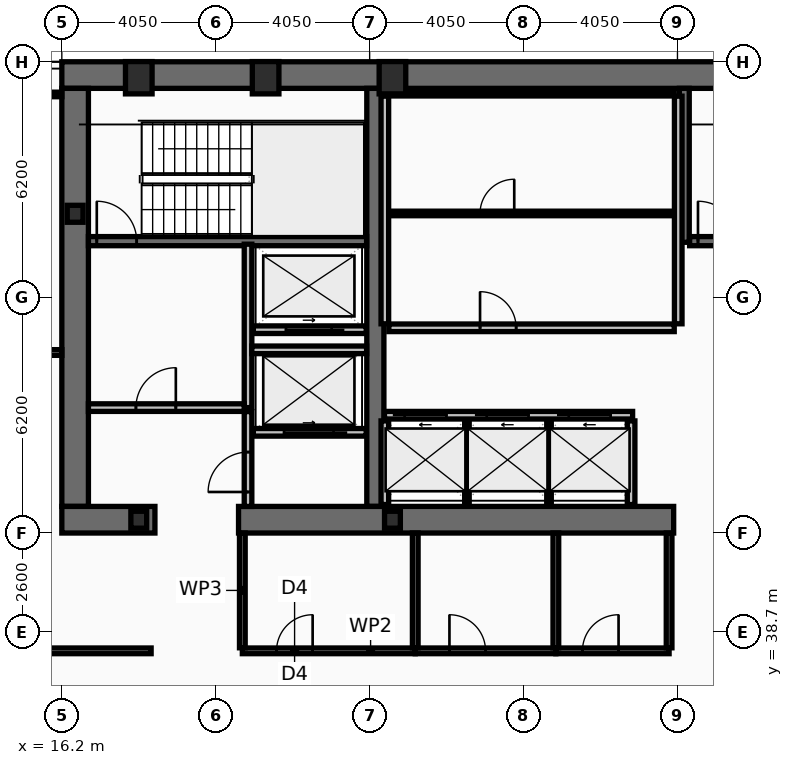
"""IFC4 building model, lengths in metres.
Left out: names, types, materials, properties, quantities, classifications, styles, units other than length and angle.
Written with IfcOpenShell. Run it as: python <this file> out.ifc"""

import sys

from ifc_helpers import new_model, si_unit, direction, frame, frame_2d, origin, origin_2d, place, context, subcontext, project, spatial, rectangle, hollow_rectangle, i_section, extrude, element, fill, save


model = new_model("IFC4")
c1 = context("Model", 3, precision=1e-05, world=origin(), true_north=direction((0.0, 1.0)))
c2 = subcontext(c1, "Body", "Model", "MODEL_VIEW")
j1 = project(units=[si_unit("LENGTHUNIT", "METRE"), si_unit("PLANEANGLEUNIT", "RADIAN")], contexts=[c1])
p1 = place(None, origin())
s1 = spatial("IfcSite", under=j1, at=p1, CompositionType="ELEMENT")
p2 = place(p1, origin())
s2 = spatial("IfcBuilding", under=s1, at=p2, CompositionType="ELEMENT")
p3 = place(p2, frame((0.0, 0.0, 118.2)))
s3 = spatial("IfcBuildingStorey", under=s2, at=p3, CompositionType="ELEMENT", Elevation=118.2)
p4 = place(p3, frame((16.2, 53.35, 0.0), z_axis=(0.0, 0.0, 1.0), x_axis=(1.0, 0.0, 0.0)))
e1 = element("IfcWall", 1, at=p4, inside=s3, PredefinedType="SHEAR", context=c2, shape_type="SweptSolid", body=[
    extrude(rectangle(XDim=40.5, YDim=0.7, at=frame_2d((20.25, 0.0))), origin(), (0.0, 0.0, 1.0), 3.44),
])
p5 = place(p3, frame((16.55, 42.0, 0.0), z_axis=(0.0, 0.0, 1.0), x_axis=(0.0, 1.0, 0.0)))
e2 = element("IfcWall", 2, at=p5, inside=s3, PredefinedType="SHEAR", context=c2, shape_type="SweptSolid", body=[
    extrude(rectangle(XDim=11.0, YDim=0.7, at=frame_2d((5.5, 0.0))), origin(), (0.0, 0.0, 1.0), 3.44),
])
p6 = place(p3, frame((24.45, 42.0, 0.0), z_axis=(0.0, 0.0, 1.0), x_axis=(0.0, 1.0, 0.0)))
e3 = element("IfcWall", 3, at=p6, inside=s3, PredefinedType="SHEAR", context=c2, shape_type="SweptSolid", body=[
    extrude(rectangle(XDim=11.0, YDim=0.45, at=frame_2d((5.5, 0.0))), origin(), (0.0, 0.0, 1.0), 3.44),
])
p7 = place(p3, frame((18.65, 41.65, 0.0), z_axis=(0.0, 0.0, 1.0), x_axis=(-1.0, 0.0, 0.0)))
e4 = element("IfcWall", 4, at=p7, inside=s3, PredefinedType="SHEAR", context=c2, shape_type="SweptSolid", body=[
    extrude(rectangle(XDim=2.45, YDim=0.7, at=frame_2d((1.225, 0.0))), origin(), (0.0, 0.0, 1.0), 3.44),
])
p8 = place(p3, frame((32.3, 41.65, 0.0), z_axis=(0.0, 0.0, 1.0), x_axis=(-1.0, 0.0, 0.0)))
e5 = element("IfcWall", 5, at=p8, inside=s3, PredefinedType="SHEAR", context=c2, shape_type="SweptSolid", body=[
    extrude(rectangle(XDim=11.45, YDim=0.7, at=frame_2d((5.725, 0.0))), origin(), (0.0, 0.0, 1.0), 3.44),
])
p9 = place(p3, frame((32.58, 48.95, 0.0), z_axis=(0.0, 0.0, 1.0), x_axis=(0.0, 1.0, 0.0)))
e6 = element("IfcWall", 6, at=p9, inside=s3, PredefinedType="SHEAR", context=c2, shape_type="SweptSolid", body=[
    extrude(rectangle(XDim=4.05, YDim=0.26, at=frame_2d((2.025, 0.0))), origin(), (0.0, 0.0, 1.0), 3.44),
])
p10 = place(p3, frame((16.9, 48.98, 0.0), z_axis=(0.0, 0.0, 1.0), x_axis=(1.0, 0.0, 0.0)))
e7 = element("IfcWall", 7, at=p10, inside=s3, PredefinedType="SHEAR", context=c2, shape_type="SweptSolid", body=[
    extrude(rectangle(XDim=7.32, YDim=0.24, at=frame_2d((3.66, 0.0))), origin(), (0.0, 0.0, 1.0), 3.44),
])
p11 = place(p10, frame((0.22, 0.0, 0.0)))
e8 = element("IfcOpeningElement", 8, at=p11, cuts=e7, PredefinedType="OPENING", context=c2, shape_type="SweptSolid", body=[
    extrude(rectangle(XDim=1.05, YDim=2.15, at=frame_2d((0.525, 1.075))), frame((0.0, 0.13, 0.0), z_axis=(0.0, -1.0, 0.0), x_axis=(1.0, 0.0, 0.0)), (0.0, 0.0, 1.0), 0.26),
])
p12 = place(p3, frame((32.72, 48.98, 0.0), z_axis=(0.0, 0.0, 1.0), x_axis=(1.0, 0.0, 0.0)))
e9 = element("IfcWall", 9, at=p12, inside=s3, PredefinedType="SHEAR", context=c2, shape_type="SweptSolid", body=[
    extrude(rectangle(XDim=7.56, YDim=0.24, at=frame_2d((3.78, 0.0))), origin(), (0.0, 0.0, 1.0), 3.44),
])
p13 = place(p12, frame((0.22, 0.0, 0.0)))
e10 = element("IfcOpeningElement", 10, at=p13, cuts=e9, PredefinedType="OPENING", context=c2, shape_type="SweptSolid", body=[
    extrude(rectangle(XDim=1.05, YDim=2.15, at=frame_2d((0.525, 1.075))), frame((0.0, 0.13, 0.0), z_axis=(0.0, -1.0, 0.0), x_axis=(1.0, 0.0, 0.0)), (0.0, 0.0, 1.0), 0.26),
])
for number, where, z_axis, x_axis in (
    (11, (18.225, 53.28, 0.0), (0.0, 0.0, 1.0), (1.0, 0.0, 0.0)),
    (12, (21.562, 53.28, 0.0), (0.0, 0.0, 1.0), (1.0, 0.0, 0.0)),
    (13, (24.9, 53.28, 0.0), (0.0, 0.0, 1.0), (1.0, 0.0, 0.0)),
):
    element("IfcColumn", number, at=place(p3, frame(where, z_axis=z_axis, x_axis=x_axis)), inside=s3, PredefinedType="COLUMN", context=c2, shape_type="SweptSolid", body=[
        extrude(hollow_rectangle(XDim=0.7, YDim=0.85, WallThickness=0.05, at=origin_2d()), origin(), (0.0, 0.0, 1.0), 3.6),
    ])
for number, where, z_axis, x_axis in (
    (14, (16.55, 49.7, 0.0), (0.0, 0.0, 1.0), (1.0, 0.0, 0.0)),
    (15, (18.225, 41.65, 0.0), (0.0, 0.0, 1.0), (1.0, 0.0, 0.0)),
    (16, (24.9, 41.65, 0.0), (0.0, 0.0, 1.0), (1.0, 0.0, 0.0)),
):
    element("IfcColumn", number, at=place(p3, frame(where, z_axis=z_axis, x_axis=x_axis)), inside=s3, PredefinedType="COLUMN", context=c2, shape_type="SweptSolid", body=[
        extrude(i_section(OverallWidth=0.416, OverallDepth=0.446, WebThickness=0.039, FlangeThickness=0.063, at=origin_2d()), origin(), (0.0, 0.0, 1.0), 3.6),
    ])
p14 = place(p3, frame((24.69, 44.4, 0.0), z_axis=(0.0, 0.0, 1.0), x_axis=(1.0, 0.0, 0.0)))
e17 = element("IfcWall", 17, at=p14, inside=s3, PredefinedType="PARTITIONING", context=c2, shape_type="SweptSolid", body=[
    extrude(rectangle(XDim=6.53, YDim=0.2, at=frame_2d((3.265, 0.0))), origin(), (0.0, 0.0, 1.0), 3.44),
])
p15 = place(p14, frame((0.53, 0.0, 0.0)))
e18 = element("IfcOpeningElement", 18, at=p15, cuts=e17, PredefinedType="OPENING", context=c2, shape_type="SweptSolid", body=[
    extrude(rectangle(XDim=1.1, YDim=2.18, at=frame_2d((0.55, 1.09))), frame((0.0, 0.11, 0.0), z_axis=(0.0, -1.0, 0.0), x_axis=(1.0, 0.0, 0.0)), (0.0, 0.0, 1.0), 0.22),
])
p16 = place(p14, frame((2.69, 0.0, 0.0)))
e19 = element("IfcOpeningElement", 19, at=p16, cuts=e17, PredefinedType="OPENING", context=c2, shape_type="SweptSolid", body=[
    extrude(rectangle(XDim=1.1, YDim=2.18, at=frame_2d((0.55, 1.09))), frame((0.0, 0.11, 0.0), z_axis=(0.0, -1.0, 0.0), x_axis=(1.0, 0.0, 0.0)), (0.0, 0.0, 1.0), 0.22),
])
p17 = place(p14, frame((4.85, 0.0, 0.0)))
e20 = element("IfcOpeningElement", 20, at=p17, cuts=e17, PredefinedType="OPENING", context=c2, shape_type="SweptSolid", body=[
    extrude(rectangle(XDim=1.1, YDim=2.18, at=frame_2d((0.55, 1.09))), frame((0.0, 0.11, 0.0), z_axis=(0.0, -1.0, 0.0), x_axis=(1.0, 0.0, 0.0)), (0.0, 0.0, 1.0), 0.22),
])
p18 = place(p3, frame((24.21, 43.95, 0.0), z_axis=(0.0, 0.0, 1.0), x_axis=(-1.0, 0.0, 0.0)))
e21 = element("IfcWall", 21, at=p18, inside=s3, PredefinedType="PARTITIONING", context=c2, shape_type="SweptSolid", body=[
    extrude(rectangle(XDim=2.97, YDim=0.2, at=frame_2d((1.485, 0.0))), origin(), (0.0, 0.0, 1.0), 3.44),
])
p19 = place(p18, frame((0.86, 0.0, 0.0)))
e22 = element("IfcOpeningElement", 22, at=p19, cuts=e21, PredefinedType="OPENING", context=c2, shape_type="SweptSolid", body=[
    extrude(rectangle(XDim=1.3, YDim=2.18, at=frame_2d((0.65, 1.09))), frame((0.0, 0.11, 0.0), z_axis=(0.0, -1.0, 0.0), x_axis=(1.0, 0.0, 0.0)), (0.0, 0.0, 1.0), 0.22),
])
p20 = place(p3, frame((24.21, 46.65, 0.0), z_axis=(0.0, 0.0, 1.0), x_axis=(-1.0, 0.0, 0.0)))
e23 = element("IfcWall", 23, at=p20, inside=s3, PredefinedType="PARTITIONING", context=c2, shape_type="SweptSolid", body=[
    extrude(rectangle(XDim=2.97, YDim=0.2, at=frame_2d((1.485, 0.0))), origin(), (0.0, 0.0, 1.0), 3.44),
])
p21 = place(p20, frame((0.91, 0.0, 0.0)))
e24 = element("IfcOpeningElement", 24, at=p21, cuts=e23, PredefinedType="OPENING", context=c2, shape_type="SweptSolid", body=[
    extrude(rectangle(XDim=1.2, YDim=2.18, at=frame_2d((0.6, 1.09))), frame((0.0, 0.11, 0.0), z_axis=(0.0, -1.0, 0.0), x_axis=(1.0, 0.0, 0.0)), (0.0, 0.0, 1.0), 0.22),
])
p22 = place(p3, frame((21.1, 44.6, 0.0), z_axis=(0.0, 0.0, 1.0), x_axis=(0.0, 1.0, 0.0)))
e25 = element("IfcWall", 25, at=p22, inside=s3, PredefinedType="PARTITIONING", context=c2, shape_type="SweptSolid", body=[
    extrude(rectangle(XDim=4.3, YDim=0.2, at=frame_2d((2.15, 0.0))), origin(), (0.0, 0.0, 1.0), 3.44),
])
p23 = place(p3, frame((16.9, 44.6, 0.0), z_axis=(0.0, 0.0, 1.0), x_axis=(1.0, 0.0, 0.0)))
e26 = element("IfcWall", 26, at=p23, inside=s3, PredefinedType="PARTITIONING", context=c2, shape_type="SweptSolid", body=[
    extrude(rectangle(XDim=4.1, YDim=0.2, at=frame_2d((2.05, 0.0))), origin(), (0.0, 0.0, 1.0), 3.44),
])
p24 = place(p23, frame((1.25, 0.0, 0.0)))
e27 = element("IfcOpeningElement", 27, at=p24, cuts=e26, PredefinedType="OPENING", context=c2, shape_type="SweptSolid", body=[
    extrude(rectangle(XDim=1.05, YDim=2.15, at=frame_2d((0.525, 1.075))), frame((0.0, 0.11, 0.0), z_axis=(0.0, -1.0, 0.0), x_axis=(1.0, 0.0, 0.0)), (0.0, 0.0, 1.0), 0.22),
])
p25 = place(p3, frame((21.2, 46.12, 0.0), z_axis=(0.0, 0.0, 1.0), x_axis=(1.0, 0.0, 0.0)))
e28 = element("IfcWall", 28, at=p25, inside=s3, PredefinedType="PARTITIONING", context=c2, shape_type="SweptSolid", body=[
    extrude(rectangle(XDim=3.02, YDim=0.2, at=frame_2d((1.51, 0.0))), origin(), (0.0, 0.0, 1.0), 3.44),
])
p26 = place(p3, frame((21.1, 42.0, 0.0), z_axis=(0.0, 0.0, 1.0), x_axis=(0.0, 1.0, 0.0)))
e29 = element("IfcWall", 29, at=p26, inside=s3, PredefinedType="PARTITIONING", context=c2, shape_type="SweptSolid", body=[
    extrude(rectangle(XDim=2.495, YDim=0.2, at=frame_2d((1.248, 0.0))), origin(), (0.0, 0.0, 1.0), 3.44),
])
p27 = place(p26, frame((0.38, 0.0, 0.0)))
e30 = element("IfcOpeningElement", 30, at=p27, cuts=e29, PredefinedType="OPENING", context=c2, shape_type="SweptSolid", body=[
    extrude(rectangle(XDim=1.05, YDim=2.15, at=frame_2d((0.525, 1.075))), frame((0.0, 0.11, 0.0), z_axis=(0.0, -1.0, 0.0), x_axis=(1.0, 0.0, 0.0)), (0.0, 0.0, 1.0), 0.22),
])
for number, where, z_axis, x_axis in (
    (31, (24.7, 46.805, 0.0), (0.0, 0.0, 1.0), (0.0, 1.0, 0.0)),
    (32, (32.42, 46.805, 0.0), (0.0, 0.0, 1.0), (0.0, 1.0, 0.0)),
):
    element("IfcWall", number, at=place(p3, frame(where, z_axis=z_axis, x_axis=x_axis)), inside=s3, PredefinedType="PARTITIONING", context=c2, shape_type="SweptSolid", body=[
        extrude(rectangle(XDim=5.99, YDim=0.2, at=frame_2d((2.995, 0.0))), origin(), (0.0, 0.0, 1.0), 3.44),
    ])
p28 = place(p3, frame((24.805, 52.86, 0.0), z_axis=(0.0, 0.0, 1.0), x_axis=(1.0, 0.0, 0.0)))
e33 = element("IfcWall", 33, at=p28, inside=s3, PredefinedType="PARTITIONING", context=c2, shape_type="SweptSolid", body=[
    extrude(rectangle(XDim=7.51, YDim=0.12, at=frame_2d((3.755, 0.0))), origin(), (0.0, 0.0, 1.0), 3.44),
])
p29 = place(p3, frame((24.805, 49.709, 0.0), z_axis=(0.0, 0.0, 1.0), x_axis=(1.0, 0.0, 0.0)))
e34 = element("IfcWall", 34, at=p29, inside=s3, PredefinedType="PARTITIONING", context=c2, shape_type="SweptSolid", body=[
    extrude(rectangle(XDim=7.51, YDim=0.12, at=frame_2d((3.755, 0.0))), origin(), (0.0, 0.0, 1.0), 3.44),
])
p30 = place(p29, frame((2.4, 0.0, 0.0)))
e35 = element("IfcOpeningElement", 35, at=p30, cuts=e34, PredefinedType="OPENING", context=c2, shape_type="SweptSolid", body=[
    extrude(rectangle(XDim=0.9, YDim=2.05, at=frame_2d((0.45, 1.025))), frame((0.0, 0.07, 0.0), z_axis=(0.0, -1.0, 0.0), x_axis=(1.0, 0.0, 0.0)), (0.0, 0.0, 1.0), 0.14),
])
p31 = place(p3, frame((24.805, 46.7, 0.0), z_axis=(0.0, 0.0, 1.0), x_axis=(1.0, 0.0, 0.0)))
e36 = element("IfcWall", 36, at=p31, inside=s3, PredefinedType="PARTITIONING", context=c2, shape_type="SweptSolid", body=[
    extrude(rectangle(XDim=7.51, YDim=0.2, at=frame_2d((3.755, 0.0))), origin(), (0.0, 0.0, 1.0), 3.44),
])
p32 = place(p31, frame((2.4, 0.0, 0.0)))
e37 = element("IfcOpeningElement", 37, at=p32, cuts=e36, PredefinedType="OPENING", context=c2, shape_type="SweptSolid", body=[
    extrude(rectangle(XDim=0.95, YDim=2.1, at=frame_2d((0.475, 1.05))), frame((0.0, 0.11, 0.0), z_axis=(0.0, -1.0, 0.0), x_axis=(1.0, 0.0, 0.0)), (0.0, 0.0, 1.0), 0.22),
])
for number, where, z_axis, x_axis in (
    (38, (24.7, 42.05, 0.0), (0.0, 0.0, 1.0), (0.0, 1.0, 0.0)),
    (39, (31.18, 42.05, 0.0), (0.0, 0.0, 1.0), (0.0, 1.0, 0.0)),
):
    element("IfcWall", number, at=place(p3, frame(where, z_axis=z_axis, x_axis=x_axis)), inside=s3, PredefinedType="PARTITIONING", context=c2, shape_type="SweptSolid", body=[
        extrude(rectangle(XDim=2.2, YDim=0.2, at=frame_2d((1.1, 0.0))), origin(), (0.0, 0.0, 1.0), 3.44),
    ])
for number, where, z_axis, x_axis in (
    (40, (26.86, 42.05, 0.0), (0.0, 0.0, 1.0), (0.0, 1.0, 0.0)),
    (41, (29.02, 42.05, 0.0), (0.0, 0.0, 1.0), (0.0, 1.0, 0.0)),
):
    element("IfcWall", number, at=place(p3, frame(where, z_axis=z_axis, x_axis=x_axis)), inside=s3, PredefinedType="PARTITIONING", context=c2, shape_type="SweptSolid", body=[
        extrude(rectangle(XDim=2.2, YDim=0.12, at=frame_2d((1.1, 0.0))), origin(), (0.0, 0.0, 1.0), 3.44),
    ])
p33 = place(p3, frame((20.95, 38.2, 0.0), z_axis=(0.0, 0.0, 1.0), x_axis=(1.0, 0.0, 0.0)))
e42 = element("IfcWall", 42, at=p33, inside=s3, PredefinedType="PARTITIONING", context=c2, shape_type="SweptSolid", body=[
    extrude(rectangle(XDim=4.55, YDim=0.15, at=frame_2d((2.275, 0.0))), origin(), (0.0, 0.0, 1.0), 2.73),
])
p34 = place(p33, frame((0.9, 0.0, 0.0)))
e43 = element("IfcOpeningElement", 43, at=p34, cuts=e42, PredefinedType="OPENING", context=c2, shape_type="SweptSolid", body=[
    extrude(rectangle(XDim=0.95, YDim=2.05, at=frame_2d((0.475, 1.025))), frame((0.0, 0.085, 0.0), z_axis=(0.0, -1.0, 0.0), x_axis=(1.0, 0.0, 0.0)), (0.0, 0.0, 1.0), 0.17),
])
p35 = place(p3, frame((25.5, 38.2, 0.0), z_axis=(0.0, 0.0, 1.0), x_axis=(1.0, 0.0, 0.0)))
e44 = element("IfcWall", 44, at=p35, inside=s3, PredefinedType="PARTITIONING", context=c2, shape_type="SweptSolid", body=[
    extrude(rectangle(XDim=3.7, YDim=0.15, at=frame_2d((1.85, 0.0))), origin(), (0.0, 0.0, 1.0), 3.44),
])
p36 = place(p35, frame((0.9, 0.0, 0.0)))
e45 = element("IfcOpeningElement", 45, at=p36, cuts=e44, PredefinedType="OPENING", context=c2, shape_type="SweptSolid", body=[
    extrude(rectangle(XDim=0.95, YDim=2.05, at=frame_2d((0.475, 1.025))), frame((0.0, 0.085, 0.0), z_axis=(0.0, -1.0, 0.0), x_axis=(1.0, 0.0, 0.0)), (0.0, 0.0, 1.0), 0.17),
])
p37 = place(p3, frame((29.2, 38.2, 0.0), z_axis=(0.0, 0.0, 1.0), x_axis=(1.0, 0.0, 0.0)))
e46 = element("IfcWall", 46, at=p37, inside=s3, PredefinedType="PARTITIONING", context=c2, shape_type="SweptSolid", body=[
    extrude(rectangle(XDim=2.98, YDim=0.15, at=frame_2d((1.49, 0.0))), origin(), (0.0, 0.0, 1.0), 2.73),
])
p38 = place(p37, frame((0.7, 0.0, 0.0)))
e47 = element("IfcOpeningElement", 47, at=p38, cuts=e46, PredefinedType="OPENING", context=c2, shape_type="SweptSolid", body=[
    extrude(rectangle(XDim=0.95, YDim=2.05, at=frame_2d((0.475, 1.025))), frame((0.0, 0.085, 0.0), z_axis=(0.0, -1.0, 0.0), x_axis=(1.0, 0.0, 0.0)), (0.0, 0.0, 1.0), 0.17),
])
for number, where, z_axis, x_axis in (
    (48, (20.95, 38.28, 0.0), (0.0, 0.0, 1.0), (0.0, 1.0, 0.0)),
    (49, (25.5, 38.28, 0.0), (0.0, 0.0, 1.0), (0.0, 1.0, 0.0)),
    (50, (29.2, 38.28, 0.0), (0.0, 0.0, 1.0), (0.0, 1.0, 0.0)),
    (51, (32.18, 38.28, 0.0), (0.0, 0.0, 1.0), (0.0, 1.0, 0.0)),
):
    element("IfcWall", number, at=place(p3, frame(where, z_axis=z_axis, x_axis=x_axis)), inside=s3, PredefinedType="PARTITIONING", context=c2, shape_type="SweptSolid", body=[
        extrude(rectangle(XDim=3.02, YDim=0.15, at=frame_2d((1.51, 0.0))), origin(), (0.0, 0.0, 1.0), 3.44),
    ])
p39 = place(p3, frame((4.03, 38.2, 0.0), z_axis=(0.0, 0.0, 1.0), x_axis=(1.0, 0.0, 0.0)))
e52 = element("IfcWall", 52, at=p39, inside=s3, PredefinedType="PARTITIONING", context=c2, shape_type="SweptSolid", body=[
    extrude(rectangle(XDim=14.52, YDim=0.15, at=frame_2d((7.26, 0.0))), origin(), (0.0, 0.0, 1.0), 2.73),
])
p40 = place(p39, frame((10.32, 0.0, 0.0)))
e53 = element("IfcOpeningElement", 53, at=p40, cuts=e52, PredefinedType="OPENING", context=c2, shape_type="SweptSolid", body=[
    extrude(rectangle(XDim=0.95, YDim=2.05, at=frame_2d((0.475, 1.025))), frame((0.0, 0.085, 0.0), z_axis=(0.0, -1.0, 0.0), x_axis=(1.0, 0.0, 0.0)), (0.0, 0.0, 1.0), 0.17),
])
p41 = place(p3, frame((4.095, 46.05, 0.0), z_axis=(0.0, 0.0, 1.0), x_axis=(1.0, 0.0, 0.0)))
e54 = element("IfcWall", 54, at=p41, inside=s3, PredefinedType="PARTITIONING", context=c2, shape_type="SweptSolid", body=[
    extrude(rectangle(XDim=12.105, YDim=0.15, at=frame_2d((6.052, 0.0))), origin(), (0.0, 0.0, 1.0), 2.83),
])
p42 = place(p41, frame((10.32, 0.0, 0.0)))
e55 = element("IfcOpeningElement", 55, at=p42, cuts=e54, PredefinedType="OPENING", context=c2, shape_type="SweptSolid", body=[
    extrude(rectangle(XDim=0.9, YDim=2.05, at=frame_2d((0.45, 1.025))), frame((0.0, 0.085, 0.0), z_axis=(0.0, -1.0, 0.0), x_axis=(1.0, 0.0, 0.0)), (0.0, 0.0, 1.0), 0.17),
])
p43 = place(p3, frame((4.095, 52.84, 0.0), z_axis=(0.0, 0.0, 1.0), x_axis=(1.0, 0.0, 0.0)))
e56 = element("IfcWall", 56, at=p43, inside=s3, PredefinedType="PARTITIONING", context=c2, shape_type="SweptSolid", body=[
    extrude(rectangle(XDim=12.105, YDim=0.12, at=frame_2d((6.052, 0.0))), origin(), (0.0, 0.0, 1.0), 3.44),
])
p44 = place(p11, origin())
e57 = element("IfcDoor", 57, at=p44, inside=s3, OperationType="SINGLE_SWING_LEFT", PredefinedType="DOOR", context=c2, shape_type="SweptSolid", body=[
    extrude(rectangle(XDim=1.05, YDim=2.15, at=frame_2d((0.525, 1.075))), frame((0.0, 0.025, 0.0), z_axis=(0.0, -1.0, 0.0), x_axis=(1.0, 0.0, 0.0)), (0.0, 0.0, 1.0), 0.05),
])
fill(e8, e57)
p45 = place(p13, origin())
e58 = element("IfcDoor", 58, at=p45, inside=s3, OperationType="SINGLE_SWING_LEFT", PredefinedType="DOOR", context=c2, shape_type="SweptSolid", body=[
    extrude(rectangle(XDim=1.05, YDim=2.15, at=frame_2d((0.525, 1.075))), frame((0.0, 0.025, 0.0), z_axis=(0.0, -1.0, 0.0), x_axis=(1.0, 0.0, 0.0)), (0.0, 0.0, 1.0), 0.05),
])
fill(e10, e58)
p46 = place(p15, origin())
e59 = element("IfcDoor", 59, at=p46, inside=s3, OperationType="SLIDING_TO_LEFT", PredefinedType="DOOR", context=c2, shape_type="SweptSolid", body=[
    extrude(rectangle(XDim=1.1, YDim=2.18, at=frame_2d((0.55, 1.09))), frame((0.0, 0.025, 0.0), z_axis=(0.0, -1.0, 0.0), x_axis=(1.0, 0.0, 0.0)), (0.0, 0.0, 1.0), 0.05),
])
fill(e18, e59)
p47 = place(p16, origin())
e60 = element("IfcDoor", 60, at=p47, inside=s3, OperationType="SLIDING_TO_LEFT", PredefinedType="DOOR", context=c2, shape_type="SweptSolid", body=[
    extrude(rectangle(XDim=1.1, YDim=2.18, at=frame_2d((0.55, 1.09))), frame((0.0, 0.025, 0.0), z_axis=(0.0, -1.0, 0.0), x_axis=(1.0, 0.0, 0.0)), (0.0, 0.0, 1.0), 0.05),
])
fill(e19, e60)
p48 = place(p17, origin())
e61 = element("IfcDoor", 61, at=p48, inside=s3, OperationType="SLIDING_TO_LEFT", PredefinedType="DOOR", context=c2, shape_type="SweptSolid", body=[
    extrude(rectangle(XDim=1.1, YDim=2.18, at=frame_2d((0.55, 1.09))), frame((0.0, 0.025, 0.0), z_axis=(0.0, -1.0, 0.0), x_axis=(1.0, 0.0, 0.0)), (0.0, 0.0, 1.0), 0.05),
])
fill(e20, e61)
p49 = place(p19, origin())
e62 = element("IfcDoor", 62, at=p49, inside=s3, OperationType="SLIDING_TO_LEFT", PredefinedType="DOOR", context=c2, shape_type="SweptSolid", body=[
    extrude(rectangle(XDim=1.3, YDim=2.18, at=frame_2d((0.65, 1.09))), frame((0.0, 0.025, 0.0), z_axis=(0.0, -1.0, 0.0), x_axis=(1.0, 0.0, 0.0)), (0.0, 0.0, 1.0), 0.05),
])
fill(e22, e62)
p50 = place(p21, origin())
e63 = element("IfcDoor", 63, at=p50, inside=s3, OperationType="SLIDING_TO_LEFT", PredefinedType="DOOR", context=c2, shape_type="SweptSolid", body=[
    extrude(rectangle(XDim=1.2, YDim=2.18, at=frame_2d((0.6, 1.09))), frame((0.0, 0.025, 0.0), z_axis=(0.0, -1.0, 0.0), x_axis=(1.0, 0.0, 0.0)), (0.0, 0.0, 1.0), 0.05),
])
fill(e24, e63)
p51 = place(p24, origin())
e64 = element("IfcDoor", 64, at=p51, inside=s3, OperationType="SINGLE_SWING_RIGHT", PredefinedType="DOOR", context=c2, shape_type="SweptSolid", body=[
    extrude(rectangle(XDim=1.05, YDim=2.15, at=frame_2d((0.525, 1.075))), frame((0.0, 0.025, 0.0), z_axis=(0.0, -1.0, 0.0), x_axis=(1.0, 0.0, 0.0)), (0.0, 0.0, 1.0), 0.05),
])
fill(e27, e64)
p52 = place(p27, origin())
e65 = element("IfcDoor", 65, at=p52, inside=s3, OperationType="SINGLE_SWING_LEFT", PredefinedType="DOOR", context=c2, shape_type="SweptSolid", body=[
    extrude(rectangle(XDim=1.05, YDim=2.15, at=frame_2d((0.525, 1.075))), frame((0.0, 0.025, 0.0), z_axis=(0.0, -1.0, 0.0), x_axis=(1.0, 0.0, 0.0)), (0.0, 0.0, 1.0), 0.05),
])
fill(e30, e65)
p53 = place(p30, origin())
e66 = element("IfcDoor", 66, at=p53, inside=s3, OperationType="SINGLE_SWING_RIGHT", PredefinedType="DOOR", context=c2, shape_type="SweptSolid", body=[
    extrude(rectangle(XDim=0.9, YDim=2.05, at=frame_2d((0.45, 1.025))), frame((0.0, 0.025, 0.0), z_axis=(0.0, -1.0, 0.0), x_axis=(1.0, 0.0, 0.0)), (0.0, 0.0, 1.0), 0.05),
])
fill(e35, e66)
p54 = place(p32, origin())
e67 = element("IfcDoor", 67, at=p54, inside=s3, OperationType="SINGLE_SWING_LEFT", PredefinedType="DOOR", context=c2, shape_type="SweptSolid", body=[
    extrude(rectangle(XDim=0.95, YDim=2.1, at=frame_2d((0.475, 1.05))), frame((0.0, 0.025, 0.0), z_axis=(0.0, -1.0, 0.0), x_axis=(1.0, 0.0, 0.0)), (0.0, 0.0, 1.0), 0.05),
])
fill(e37, e67)
p55 = place(p34, origin())
e68 = element("IfcDoor", 68, at=p55, inside=s3, OperationType="SINGLE_SWING_RIGHT", PredefinedType="DOOR", context=c2, shape_type="SweptSolid", body=[
    extrude(rectangle(XDim=0.95, YDim=2.05, at=frame_2d((0.475, 1.025))), frame((0.0, 0.025, 0.0), z_axis=(0.0, -1.0, 0.0), x_axis=(1.0, 0.0, 0.0)), (0.0, 0.0, 1.0), 0.05),
])
fill(e43, e68)
p56 = place(p36, origin())
e69 = element("IfcDoor", 69, at=p56, inside=s3, OperationType="SINGLE_SWING_LEFT", PredefinedType="DOOR", context=c2, shape_type="SweptSolid", body=[
    extrude(rectangle(XDim=0.95, YDim=2.05, at=frame_2d((0.475, 1.025))), frame((0.0, 0.025, 0.0), z_axis=(0.0, -1.0, 0.0), x_axis=(1.0, 0.0, 0.0)), (0.0, 0.0, 1.0), 0.05),
])
fill(e45, e69)
p57 = place(p38, origin())
e70 = element("IfcDoor", 70, at=p57, inside=s3, OperationType="SINGLE_SWING_RIGHT", PredefinedType="DOOR", context=c2, shape_type="SweptSolid", body=[
    extrude(rectangle(XDim=0.95, YDim=2.05, at=frame_2d((0.475, 1.025))), frame((0.0, 0.025, 0.0), z_axis=(0.0, -1.0, 0.0), x_axis=(1.0, 0.0, 0.0)), (0.0, 0.0, 1.0), 0.05),
])
fill(e47, e70)
save(model, sys.argv[1])
